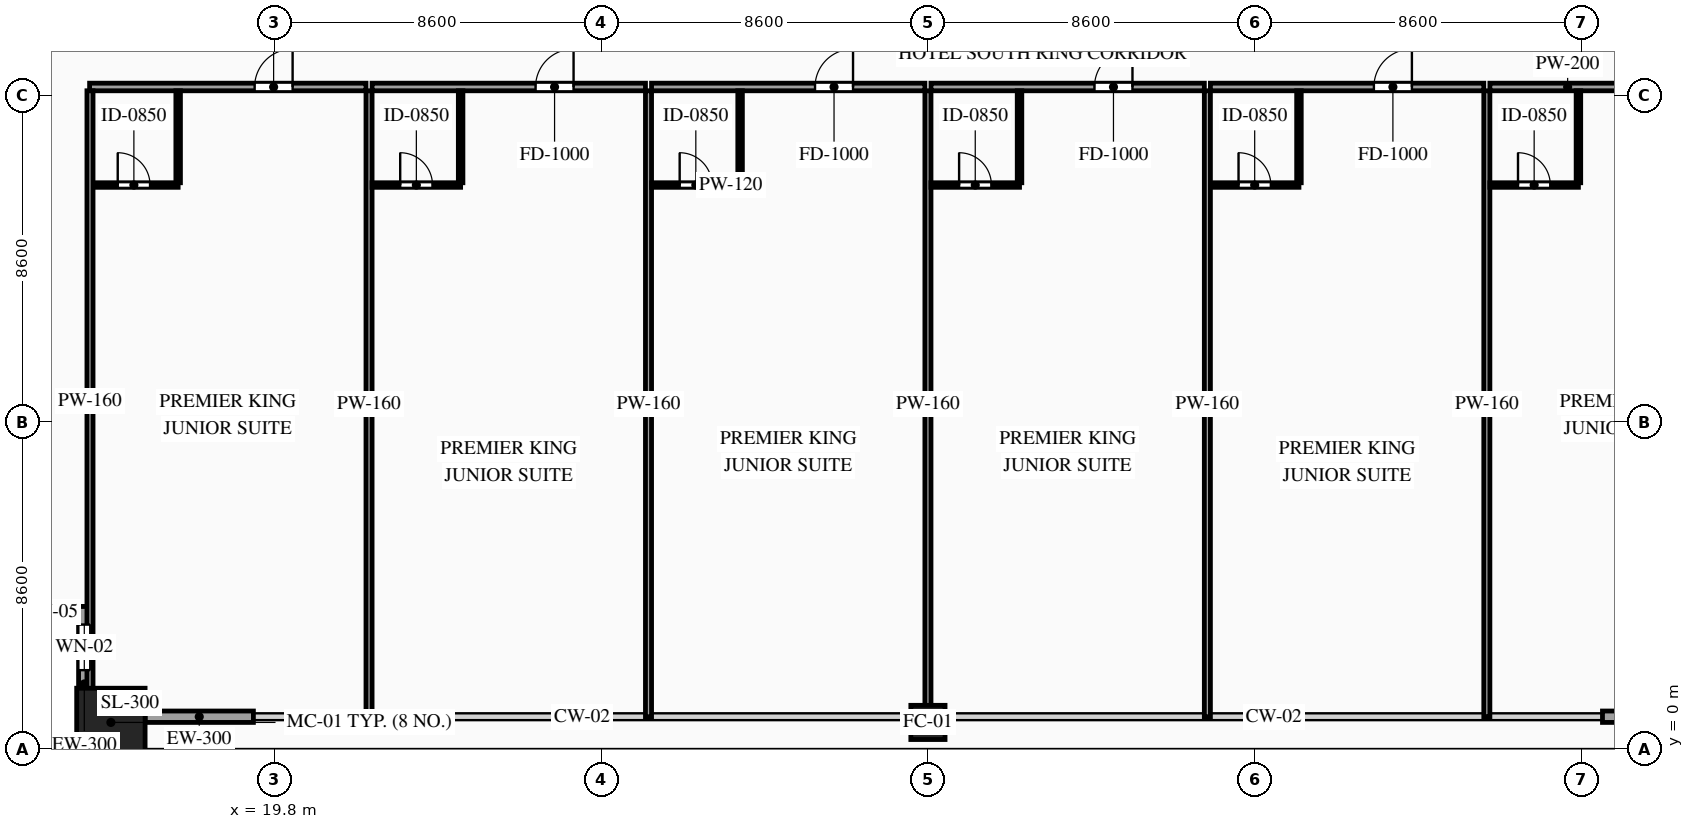
"""IFC4 building model, lengths in metres.
Left out: names, types, materials, properties, quantities, classifications, styles, units other than length and angle.
Written with IfcOpenShell. Run it as: python <this file> out.ifc"""

import sys

from ifc_helpers import new_model, si_unit, direction, frame, frame_2d, origin, origin_2d, place, context, subcontext, project, spatial, rectangle, hollow_rectangle, extrude, source, transform, mapped, element, fill, save


model = new_model("IFC4")
c1 = context("Model", 3, precision=1e-05, world=origin(), true_north=direction((0.0, 1.0)))
c2 = subcontext(c1, "Body", "Model", "MODEL_VIEW")
j1 = project(units=[si_unit("LENGTHUNIT", "METRE"), si_unit("PLANEANGLEUNIT", "RADIAN")], contexts=[c1])
p1 = place(None, origin())
s1 = spatial("IfcSite", under=j1, at=p1, CompositionType="ELEMENT")
p2 = place(p1, origin())
s2 = spatial("IfcBuilding", under=s1, at=p2, CompositionType="ELEMENT")
p3 = place(p2, frame((0.0, 0.0, 30.6)))
s3 = spatial("IfcBuildingStorey", under=s2, at=p3, CompositionType="ELEMENT", Elevation=30.6)
m1 = source(origin(), c2, "Body", "SweptSolid", [
    extrude(hollow_rectangle(XDim=1.8, YDim=1.8, WallThickness=0.08, at=origin_2d()), origin(), (0.0, 0.0, 1.0), 3.6),
])
p4 = place(p3, frame((15.5, 0.7, 0.0), z_axis=(0.0, 0.0, 1.0), x_axis=(1.0, 0.0, 0.0)))
e1 = element("IfcColumn", 1, at=p4, inside=s3, PredefinedType="COLUMN", context=c2, shape_type="MappedRepresentation", body=[
    mapped(m1, transform((0.0, 0.0, 0.0), scale=1.0)),
])
m2 = source(origin(), c2, "Body", "SweptSolid", [
    extrude(hollow_rectangle(XDim=0.9, YDim=0.9, WallThickness=0.042, at=origin_2d()), origin(), (0.0, 0.0, 1.0), 3.6),
])
p5 = place(p3, frame((37.0, 0.7, 0.0), z_axis=(0.0, 0.0, 1.0), x_axis=(1.0, 0.0, 0.0)))
e2 = element("IfcColumn", 2, at=p5, inside=s3, PredefinedType="COLUMN", context=c2, shape_type="MappedRepresentation", body=[
    mapped(m2, transform((0.0, 0.0, 0.0), scale=1.0)),
])
p6 = place(p3, frame((12.8, 3.6, 0.0), z_axis=(0.0, 0.0, 1.0), x_axis=(1.0, 0.0, 0.0)))
e3 = element("IfcWall", 3, at=p6, inside=s3, PredefinedType="SOLIDWALL", context=c2, shape_type="SweptSolid", body=[
    extrude(rectangle(XDim=2.15, YDim=0.3, at=frame_2d((1.075, 0.0))), origin(), (0.0, 0.0, 1.0), 3.38),
])
p7 = place(p6, frame((0.625, 0.0, 0.85)))
e4 = element("IfcOpeningElement", 4, at=p7, cuts=e3, PredefinedType="OPENING", context=c2, shape_type="SweptSolid", body=[
    extrude(rectangle(XDim=0.9, YDim=1.5, at=frame_2d((0.45, 0.75))), frame((0.0, 0.165, 0.0), z_axis=(0.0, -1.0, 0.0), x_axis=(1.0, 0.0, 0.0)), (0.0, 0.0, 1.0), 0.33),
])
p8 = place(p3, frame((14.8, 3.75, 0.0), z_axis=(0.0, 0.0, 1.0), x_axis=(0.0, -1.0, 0.0)))
e5 = element("IfcWall", 5, at=p8, inside=s3, PredefinedType="SOLIDWALL", context=c2, shape_type="SweptSolid", body=[
    extrude(rectangle(XDim=2.15, YDim=0.3, at=frame_2d((1.075, 0.0))), origin(), (0.0, 0.0, 1.0), 3.38),
])
p9 = place(p8, frame((0.475, 0.0, 0.85)))
e6 = element("IfcOpeningElement", 6, at=p9, cuts=e5, PredefinedType="OPENING", context=c2, shape_type="SweptSolid", body=[
    extrude(rectangle(XDim=1.2, YDim=2.1, at=frame_2d((0.6, 1.05))), frame((0.0, 0.165, 0.0), z_axis=(0.0, -1.0, 0.0), x_axis=(1.0, 0.0, 0.0)), (0.0, 0.0, 1.0), 0.33),
])
m3 = source(origin(), c2, "Body", "SweptSolid", [
    extrude(rectangle(XDim=2.85, YDim=0.3, at=frame_2d((1.425, 0.0))), origin(), (0.0, 0.0, 1.0), 2.775),
])
for number, where, z_axis, x_axis in (
    (7, (16.4, 0.85, 0.0), (0.0, 0.0, 1.0), (1.0, 0.0, 0.0)),
    (8, (54.75, 0.85, 0.0), (0.0, 0.0, 1.0), (1.0, 0.0, 0.0)),
):
    element("IfcWall", number, at=place(p3, frame(where, z_axis=z_axis, x_axis=x_axis)), inside=s3, PredefinedType="SOLIDWALL", context=c2, shape_type="MappedRepresentation", body=[
        mapped(m3, transform((0.0, 0.0, 0.0), scale=1.0)),
    ])
p10 = place(p3, frame((14.94, 17.42, 0.0), z_axis=(0.0, 0.0, 1.0), x_axis=(1.0, 0.0, 0.0)))
e9 = element("IfcWall", 9, at=p10, inside=s3, PredefinedType="PARTITIONING", context=c2, shape_type="SweptSolid", body=[
    extrude(rectangle(XDim=7.273, YDim=0.2, at=frame_2d((3.636, 0.0))), origin(), (0.0, 0.0, 1.0), 3.38),
])
p11 = place(p10, frame((4.342, 0.0, 0.0)))
e10 = element("IfcOpeningElement", 10, at=p11, cuts=e9, PredefinedType="OPENING", context=c2, shape_type="SweptSolid", body=[
    extrude(rectangle(XDim=1.0, YDim=2.2, at=frame_2d((0.5, 1.1))), frame((0.0, 0.115, 0.0), z_axis=(0.0, -1.0, 0.0), x_axis=(1.0, 0.0, 0.0)), (0.0, 0.0, 1.0), 0.23),
])
m4 = source(origin(), c2, "Body", "SweptSolid", [
    extrude(rectangle(XDim=16.47, YDim=0.16, at=frame_2d((8.235, 0.0))), origin(), (0.0, 0.0, 1.0), 3.38),
])
p12 = place(p3, frame((22.293, 0.85, 0.0), z_axis=(0.0, 0.0, 1.0), x_axis=(0.0, 1.0, 0.0)))
e11 = element("IfcWall", 11, at=p12, inside=s3, PredefinedType="PARTITIONING", context=c2, shape_type="MappedRepresentation", body=[
    mapped(m4, transform((0.0, 0.0, 0.0), scale=1.0)),
])
p13 = place(p3, frame((14.94, 14.84, 0.0), z_axis=(0.0, 0.0, 1.0), x_axis=(1.0, 0.0, 0.0)))
e12 = element("IfcWall", 12, at=p13, inside=s3, PredefinedType="PARTITIONING", context=c2, shape_type="SweptSolid", body=[
    extrude(rectangle(XDim=2.33, YDim=0.12, at=frame_2d((1.165, 0.0))), origin(), (0.0, 0.0, 1.0), 3.38),
])
p14 = place(p13, frame((0.74, 0.0, 0.0)))
e13 = element("IfcOpeningElement", 13, at=p14, cuts=e12, PredefinedType="OPENING", context=c2, shape_type="SweptSolid", body=[
    extrude(rectangle(XDim=0.85, YDim=2.1, at=frame_2d((0.425, 1.05))), frame((0.0, 0.075, 0.0), z_axis=(0.0, -1.0, 0.0), x_axis=(1.0, 0.0, 0.0)), (0.0, 0.0, 1.0), 0.15),
])
m5 = source(origin(), c2, "Body", "SweptSolid", [
    extrude(rectangle(XDim=2.42, YDim=0.12, at=frame_2d((1.21, 0.0))), origin(), (0.0, 0.0, 1.0), 3.38),
])
p15 = place(p3, frame((17.27, 14.9, 0.0), z_axis=(0.0, 0.0, 1.0), x_axis=(0.0, 1.0, 0.0)))
e14 = element("IfcWall", 14, at=p15, inside=s3, PredefinedType="PARTITIONING", context=c2, shape_type="MappedRepresentation", body=[
    mapped(m5, transform((0.0, 0.0, 0.0), scale=1.0)),
])
p16 = place(p3, frame((22.373, 17.42, 0.0), z_axis=(0.0, 0.0, 1.0), x_axis=(1.0, 0.0, 0.0)))
e15 = element("IfcWall", 15, at=p16, inside=s3, PredefinedType="PARTITIONING", context=c2, shape_type="SweptSolid", body=[
    extrude(rectangle(XDim=7.194, YDim=0.2, at=frame_2d((3.597, 0.0))), origin(), (0.0, 0.0, 1.0), 3.38),
])
p17 = place(p16, frame((4.302, 0.0, 0.0)))
e16 = element("IfcOpeningElement", 16, at=p17, cuts=e15, PredefinedType="OPENING", context=c2, shape_type="SweptSolid", body=[
    extrude(rectangle(XDim=1.0, YDim=2.2, at=frame_2d((0.5, 1.1))), frame((0.0, 0.115, 0.0), z_axis=(0.0, -1.0, 0.0), x_axis=(1.0, 0.0, 0.0)), (0.0, 0.0, 1.0), 0.23),
])
p18 = place(p3, frame((29.647, 0.85, 0.0), z_axis=(0.0, 0.0, 1.0), x_axis=(0.0, 1.0, 0.0)))
e17 = element("IfcWall", 17, at=p18, inside=s3, PredefinedType="PARTITIONING", context=c2, shape_type="MappedRepresentation", body=[
    mapped(m4, transform((0.0, 0.0, 0.0), scale=1.0)),
])
p19 = place(p3, frame((22.373, 14.84, 0.0), z_axis=(0.0, 0.0, 1.0), x_axis=(1.0, 0.0, 0.0)))
e18 = element("IfcWall", 18, at=p19, inside=s3, PredefinedType="PARTITIONING", context=c2, shape_type="SweptSolid", body=[
    extrude(rectangle(XDim=2.33, YDim=0.12, at=frame_2d((1.165, 0.0))), origin(), (0.0, 0.0, 1.0), 3.38),
])
p20 = place(p19, frame((0.74, 0.0, 0.0)))
e19 = element("IfcOpeningElement", 19, at=p20, cuts=e18, PredefinedType="OPENING", context=c2, shape_type="SweptSolid", body=[
    extrude(rectangle(XDim=0.85, YDim=2.1, at=frame_2d((0.425, 1.05))), frame((0.0, 0.075, 0.0), z_axis=(0.0, -1.0, 0.0), x_axis=(1.0, 0.0, 0.0)), (0.0, 0.0, 1.0), 0.15),
])
p21 = place(p3, frame((24.703, 14.9, 0.0), z_axis=(0.0, 0.0, 1.0), x_axis=(0.0, 1.0, 0.0)))
e20 = element("IfcWall", 20, at=p21, inside=s3, PredefinedType="PARTITIONING", context=c2, shape_type="MappedRepresentation", body=[
    mapped(m5, transform((0.0, 0.0, 0.0), scale=1.0)),
])
p22 = place(p3, frame((29.727, 17.42, 0.0), z_axis=(0.0, 0.0, 1.0), x_axis=(1.0, 0.0, 0.0)))
e21 = element("IfcWall", 21, at=p22, inside=s3, PredefinedType="PARTITIONING", context=c2, shape_type="SweptSolid", body=[
    extrude(rectangle(XDim=7.193, YDim=0.2, at=frame_2d((3.596, 0.0))), origin(), (0.0, 0.0, 1.0), 3.38),
])
p23 = place(p22, frame((4.302, 0.0, 0.0)))
e22 = element("IfcOpeningElement", 22, at=p23, cuts=e21, PredefinedType="OPENING", context=c2, shape_type="SweptSolid", body=[
    extrude(rectangle(XDim=1.0, YDim=2.2, at=frame_2d((0.5, 1.1))), frame((0.0, 0.115, 0.0), z_axis=(0.0, -1.0, 0.0), x_axis=(1.0, 0.0, 0.0)), (0.0, 0.0, 1.0), 0.23),
])
m6 = source(origin(), c2, "Body", "SweptSolid", [
    extrude(rectangle(XDim=16.47, YDim=0.16, at=frame_2d((8.235, 0.0))), origin(), (0.0, 0.0, 1.0), 2.575),
])
p24 = place(p3, frame((37.0, 0.85, 0.0), z_axis=(0.0, 0.0, 1.0), x_axis=(0.0, 1.0, 0.0)))
e23 = element("IfcWall", 23, at=p24, inside=s3, PredefinedType="PARTITIONING", context=c2, shape_type="MappedRepresentation", body=[
    mapped(m6, transform((0.0, 0.0, 0.0), scale=1.0)),
])
p25 = place(p3, frame((29.727, 14.84, 0.0), z_axis=(0.0, 0.0, 1.0), x_axis=(1.0, 0.0, 0.0)))
e24 = element("IfcWall", 24, at=p25, inside=s3, PredefinedType="PARTITIONING", context=c2, shape_type="SweptSolid", body=[
    extrude(rectangle(XDim=2.33, YDim=0.12, at=frame_2d((1.165, 0.0))), origin(), (0.0, 0.0, 1.0), 3.38),
])
p26 = place(p25, frame((0.74, 0.0, 0.0)))
e25 = element("IfcOpeningElement", 25, at=p26, cuts=e24, PredefinedType="OPENING", context=c2, shape_type="SweptSolid", body=[
    extrude(rectangle(XDim=0.85, YDim=2.1, at=frame_2d((0.425, 1.05))), frame((0.0, 0.075, 0.0), z_axis=(0.0, -1.0, 0.0), x_axis=(1.0, 0.0, 0.0)), (0.0, 0.0, 1.0), 0.15),
])
p27 = place(p3, frame((32.057, 14.9, 0.0), z_axis=(0.0, 0.0, 1.0), x_axis=(0.0, 1.0, 0.0)))
e26 = element("IfcWall", 26, at=p27, inside=s3, PredefinedType="PARTITIONING", context=c2, shape_type="MappedRepresentation", body=[
    mapped(m5, transform((0.0, 0.0, 0.0), scale=1.0)),
])
p28 = place(p3, frame((37.08, 17.42, 0.0), z_axis=(0.0, 0.0, 1.0), x_axis=(1.0, 0.0, 0.0)))
e27 = element("IfcWall", 27, at=p28, inside=s3, PredefinedType="PARTITIONING", context=c2, shape_type="SweptSolid", body=[
    extrude(rectangle(XDim=7.193, YDim=0.2, at=frame_2d((3.596, 0.0))), origin(), (0.0, 0.0, 1.0), 3.38),
])
p29 = place(p28, frame((4.302, 0.0, 0.0)))
e28 = element("IfcOpeningElement", 28, at=p29, cuts=e27, PredefinedType="OPENING", context=c2, shape_type="SweptSolid", body=[
    extrude(rectangle(XDim=1.0, YDim=2.2, at=frame_2d((0.5, 1.1))), frame((0.0, 0.115, 0.0), z_axis=(0.0, -1.0, 0.0), x_axis=(1.0, 0.0, 0.0)), (0.0, 0.0, 1.0), 0.23),
])
p30 = place(p3, frame((44.353, 0.85, 0.0), z_axis=(0.0, 0.0, 1.0), x_axis=(0.0, 1.0, 0.0)))
e29 = element("IfcWall", 29, at=p30, inside=s3, PredefinedType="PARTITIONING", context=c2, shape_type="MappedRepresentation", body=[
    mapped(m4, transform((0.0, 0.0, 0.0), scale=1.0)),
])
p31 = place(p3, frame((37.08, 14.84, 0.0), z_axis=(0.0, 0.0, 1.0), x_axis=(1.0, 0.0, 0.0)))
e30 = element("IfcWall", 30, at=p31, inside=s3, PredefinedType="PARTITIONING", context=c2, shape_type="SweptSolid", body=[
    extrude(rectangle(XDim=2.33, YDim=0.12, at=frame_2d((1.165, 0.0))), origin(), (0.0, 0.0, 1.0), 3.38),
])
p32 = place(p31, frame((0.74, 0.0, 0.0)))
e31 = element("IfcOpeningElement", 31, at=p32, cuts=e30, PredefinedType="OPENING", context=c2, shape_type="SweptSolid", body=[
    extrude(rectangle(XDim=0.85, YDim=2.1, at=frame_2d((0.425, 1.05))), frame((0.0, 0.075, 0.0), z_axis=(0.0, -1.0, 0.0), x_axis=(1.0, 0.0, 0.0)), (0.0, 0.0, 1.0), 0.15),
])
p33 = place(p3, frame((39.41, 14.9, 0.0), z_axis=(0.0, 0.0, 1.0), x_axis=(0.0, 1.0, 0.0)))
e32 = element("IfcWall", 32, at=p33, inside=s3, PredefinedType="PARTITIONING", context=c2, shape_type="MappedRepresentation", body=[
    mapped(m5, transform((0.0, 0.0, 0.0), scale=1.0)),
])
p34 = place(p3, frame((44.433, 17.42, 0.0), z_axis=(0.0, 0.0, 1.0), x_axis=(1.0, 0.0, 0.0)))
e33 = element("IfcWall", 33, at=p34, inside=s3, PredefinedType="PARTITIONING", context=c2, shape_type="SweptSolid", body=[
    extrude(rectangle(XDim=7.194, YDim=0.2, at=frame_2d((3.597, 0.0))), origin(), (0.0, 0.0, 1.0), 3.38),
])
p35 = place(p34, frame((4.302, 0.0, 0.0)))
e34 = element("IfcOpeningElement", 34, at=p35, cuts=e33, PredefinedType="OPENING", context=c2, shape_type="SweptSolid", body=[
    extrude(rectangle(XDim=1.0, YDim=2.2, at=frame_2d((0.5, 1.1))), frame((0.0, 0.115, 0.0), z_axis=(0.0, -1.0, 0.0), x_axis=(1.0, 0.0, 0.0)), (0.0, 0.0, 1.0), 0.23),
])
p36 = place(p3, frame((51.707, 0.85, 0.0), z_axis=(0.0, 0.0, 1.0), x_axis=(0.0, 1.0, 0.0)))
e35 = element("IfcWall", 35, at=p36, inside=s3, PredefinedType="PARTITIONING", context=c2, shape_type="MappedRepresentation", body=[
    mapped(m4, transform((0.0, 0.0, 0.0), scale=1.0)),
])
p37 = place(p3, frame((44.433, 14.84, 0.0), z_axis=(0.0, 0.0, 1.0), x_axis=(1.0, 0.0, 0.0)))
e36 = element("IfcWall", 36, at=p37, inside=s3, PredefinedType="PARTITIONING", context=c2, shape_type="SweptSolid", body=[
    extrude(rectangle(XDim=2.33, YDim=0.12, at=frame_2d((1.165, 0.0))), origin(), (0.0, 0.0, 1.0), 3.38),
])
p38 = place(p37, frame((0.74, 0.0, 0.0)))
e37 = element("IfcOpeningElement", 37, at=p38, cuts=e36, PredefinedType="OPENING", context=c2, shape_type="SweptSolid", body=[
    extrude(rectangle(XDim=0.85, YDim=2.1, at=frame_2d((0.425, 1.05))), frame((0.0, 0.075, 0.0), z_axis=(0.0, -1.0, 0.0), x_axis=(1.0, 0.0, 0.0)), (0.0, 0.0, 1.0), 0.15),
])
p39 = place(p3, frame((46.763, 14.9, 0.0), z_axis=(0.0, 0.0, 1.0), x_axis=(0.0, 1.0, 0.0)))
e38 = element("IfcWall", 38, at=p39, inside=s3, PredefinedType="PARTITIONING", context=c2, shape_type="MappedRepresentation", body=[
    mapped(m5, transform((0.0, 0.0, 0.0), scale=1.0)),
])
p40 = place(p3, frame((51.787, 17.42, 0.0), z_axis=(0.0, 0.0, 1.0), x_axis=(1.0, 0.0, 0.0)))
e39 = element("IfcWall", 39, at=p40, inside=s3, PredefinedType="PARTITIONING", context=c2, shape_type="SweptSolid", body=[
    extrude(rectangle(XDim=7.273, YDim=0.2, at=frame_2d((3.636, 0.0))), origin(), (0.0, 0.0, 1.0), 3.38),
])
p41 = place(p40, frame((4.342, 0.0, 0.0)))
e40 = element("IfcOpeningElement", 40, at=p41, cuts=e39, PredefinedType="OPENING", context=c2, shape_type="SweptSolid", body=[
    extrude(rectangle(XDim=1.0, YDim=2.2, at=frame_2d((0.5, 1.1))), frame((0.0, 0.115, 0.0), z_axis=(0.0, -1.0, 0.0), x_axis=(1.0, 0.0, 0.0)), (0.0, 0.0, 1.0), 0.23),
])
m7 = source(origin(), c2, "Body", "SweptSolid", [
    extrude(rectangle(XDim=16.32, YDim=0.16, at=frame_2d((8.16, 0.0))), origin(), (0.0, 0.0, 1.0), 3.38),
])
p42 = place(p3, frame((14.95, 1.0, 0.0), z_axis=(0.0, 0.0, 1.0), x_axis=(0.0, 1.0, 0.0)))
e41 = element("IfcWall", 41, at=p42, inside=s3, PredefinedType="PARTITIONING", context=c2, shape_type="MappedRepresentation", body=[
    mapped(m7, transform((0.0, 0.0, 0.0), scale=1.0)),
])
p43 = place(p3, frame((51.787, 14.84, 0.0), z_axis=(0.0, 0.0, 1.0), x_axis=(1.0, 0.0, 0.0)))
e42 = element("IfcWall", 42, at=p43, inside=s3, PredefinedType="PARTITIONING", context=c2, shape_type="SweptSolid", body=[
    extrude(rectangle(XDim=2.33, YDim=0.12, at=frame_2d((1.165, 0.0))), origin(), (0.0, 0.0, 1.0), 3.38),
])
p44 = place(p43, frame((0.74, 0.0, 0.0)))
e43 = element("IfcOpeningElement", 43, at=p44, cuts=e42, PredefinedType="OPENING", context=c2, shape_type="SweptSolid", body=[
    extrude(rectangle(XDim=0.85, YDim=2.1, at=frame_2d((0.425, 1.05))), frame((0.0, 0.075, 0.0), z_axis=(0.0, -1.0, 0.0), x_axis=(1.0, 0.0, 0.0)), (0.0, 0.0, 1.0), 0.15),
])
p45 = place(p3, frame((54.117, 14.9, 0.0), z_axis=(0.0, 0.0, 1.0), x_axis=(0.0, 1.0, 0.0)))
e44 = element("IfcWall", 44, at=p45, inside=s3, PredefinedType="PARTITIONING", context=c2, shape_type="MappedRepresentation", body=[
    mapped(m5, transform((0.0, 0.0, 0.0), scale=1.0)),
])
m8 = source(origin(), c2, "Body", "SweptSolid", [
    extrude(rectangle(XDim=0.9, YDim=1.5, at=frame_2d((0.45, 0.75))), frame((0.0, 0.03, 0.0), z_axis=(0.0, -1.0, 0.0), x_axis=(1.0, 0.0, 0.0)), (0.0, 0.0, 1.0), 0.06),
])
p46 = place(p7, origin())
e45 = element("IfcWindow", 45, at=p46, inside=s3, PartitioningType="SINGLE_PANEL", PredefinedType="WINDOW", context=c2, shape_type="MappedRepresentation", body=[
    mapped(m8, transform((0.0, 0.0, 0.0), scale=1.0)),
])
fill(e4, e45)
m9 = source(origin(), c2, "Body", "SweptSolid", [
    extrude(rectangle(XDim=1.2, YDim=2.1, at=frame_2d((0.6, 1.05))), frame((0.0, 0.03, 0.0), z_axis=(0.0, -1.0, 0.0), x_axis=(1.0, 0.0, 0.0)), (0.0, 0.0, 1.0), 0.06),
])
p47 = place(p9, origin())
e46 = element("IfcWindow", 46, at=p47, inside=s3, PartitioningType="SINGLE_PANEL", PredefinedType="WINDOW", context=c2, shape_type="MappedRepresentation", body=[
    mapped(m9, transform((0.0, 0.0, 0.0), scale=1.0)),
])
fill(e6, e46)
m10 = source(origin(), c2, "Body", "SweptSolid", [
    extrude(rectangle(XDim=1.0, YDim=2.2, at=frame_2d((0.5, 1.1))), frame((0.0, 0.025, 0.0), z_axis=(0.0, -1.0, 0.0), x_axis=(1.0, 0.0, 0.0)), (0.0, 0.0, 1.0), 0.05),
])
p48 = place(p11, origin())
e47 = element("IfcDoor", 47, at=p48, inside=s3, OperationType="SINGLE_SWING_RIGHT", PredefinedType="DOOR", context=c2, shape_type="MappedRepresentation", body=[
    mapped(m10, transform((0.0, 0.0, 0.0), scale=1.0)),
])
fill(e10, e47)
m11 = source(origin(), c2, "Body", "SweptSolid", [
    extrude(rectangle(XDim=0.85, YDim=2.1, at=frame_2d((0.425, 1.05))), frame((0.0, 0.025, 0.0), z_axis=(0.0, -1.0, 0.0), x_axis=(1.0, 0.0, 0.0)), (0.0, 0.0, 1.0), 0.05),
])
p49 = place(p14, origin())
e48 = element("IfcDoor", 48, at=p49, inside=s3, OperationType="SINGLE_SWING_LEFT", PredefinedType="DOOR", context=c2, shape_type="MappedRepresentation", body=[
    mapped(m11, transform((0.0, 0.0, 0.0), scale=1.0)),
])
fill(e13, e48)
p50 = place(p17, origin())
e49 = element("IfcDoor", 49, at=p50, inside=s3, OperationType="SINGLE_SWING_RIGHT", PredefinedType="DOOR", context=c2, shape_type="MappedRepresentation", body=[
    mapped(m10, transform((0.0, 0.0, 0.0), scale=1.0)),
])
fill(e16, e49)
p51 = place(p20, origin())
e50 = element("IfcDoor", 50, at=p51, inside=s3, OperationType="SINGLE_SWING_LEFT", PredefinedType="DOOR", context=c2, shape_type="MappedRepresentation", body=[
    mapped(m11, transform((0.0, 0.0, 0.0), scale=1.0)),
])
fill(e19, e50)
p52 = place(p23, origin())
e51 = element("IfcDoor", 51, at=p52, inside=s3, OperationType="SINGLE_SWING_RIGHT", PredefinedType="DOOR", context=c2, shape_type="MappedRepresentation", body=[
    mapped(m10, transform((0.0, 0.0, 0.0), scale=1.0)),
])
fill(e22, e51)
p53 = place(p26, origin())
e52 = element("IfcDoor", 52, at=p53, inside=s3, OperationType="SINGLE_SWING_LEFT", PredefinedType="DOOR", context=c2, shape_type="MappedRepresentation", body=[
    mapped(m11, transform((0.0, 0.0, 0.0), scale=1.0)),
])
fill(e25, e52)
p54 = place(p29, origin())
e53 = element("IfcDoor", 53, at=p54, inside=s3, OperationType="SINGLE_SWING_RIGHT", PredefinedType="DOOR", context=c2, shape_type="MappedRepresentation", body=[
    mapped(m10, transform((0.0, 0.0, 0.0), scale=1.0)),
])
fill(e28, e53)
p55 = place(p32, origin())
e54 = element("IfcDoor", 54, at=p55, inside=s3, OperationType="SINGLE_SWING_LEFT", PredefinedType="DOOR", context=c2, shape_type="MappedRepresentation", body=[
    mapped(m11, transform((0.0, 0.0, 0.0), scale=1.0)),
])
fill(e31, e54)
p56 = place(p35, origin())
e55 = element("IfcDoor", 55, at=p56, inside=s3, OperationType="SINGLE_SWING_RIGHT", PredefinedType="DOOR", context=c2, shape_type="MappedRepresentation", body=[
    mapped(m10, transform((0.0, 0.0, 0.0), scale=1.0)),
])
fill(e34, e55)
p57 = place(p38, origin())
e56 = element("IfcDoor", 56, at=p57, inside=s3, OperationType="SINGLE_SWING_LEFT", PredefinedType="DOOR", context=c2, shape_type="MappedRepresentation", body=[
    mapped(m11, transform((0.0, 0.0, 0.0), scale=1.0)),
])
fill(e37, e56)
p58 = place(p44, origin())
e57 = element("IfcDoor", 57, at=p58, inside=s3, OperationType="SINGLE_SWING_LEFT", PredefinedType="DOOR", context=c2, shape_type="MappedRepresentation", body=[
    mapped(m11, transform((0.0, 0.0, 0.0), scale=1.0)),
])
fill(e43, e57)
save(model, sys.argv[1])
